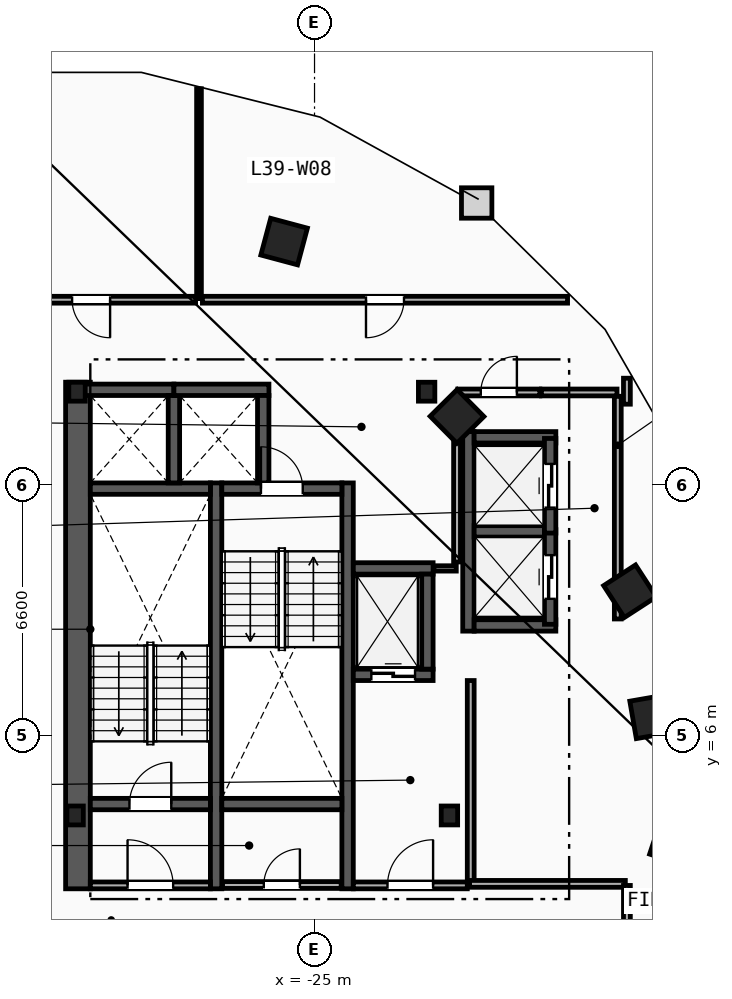
"""IFC4 building model, lengths in metres.
Left out: names, types, materials, properties, quantities, classifications, styles, units other than length and angle.
Written with IfcOpenShell. Run it as: python <this file> out.ifc"""

import sys

from ifc_helpers import new_model, si_unit, direction, frame, frame_2d, origin, origin_2d, place, context, subcontext, project, spatial, rectangle, i_section, extrude, element, fill, save


model = new_model("IFC4")
c1 = context("Model", 3, precision=1e-05, world=origin(), true_north=direction((0.0, 1.0)))
c2 = subcontext(c1, "Body", "Model", "MODEL_VIEW")
j1 = project(units=[si_unit("LENGTHUNIT", "METRE"), si_unit("PLANEANGLEUNIT", "RADIAN")], contexts=[c1])
p1 = place(None, origin())
s1 = spatial("IfcSite", under=j1, at=p1, CompositionType="ELEMENT")
p2 = place(p1, origin())
s2 = spatial("IfcBuilding", under=s1, at=p2, CompositionType="ELEMENT")
p3 = place(p2, frame((0.0, 0.0, 151.2)))
s3 = spatial("IfcBuildingStorey", under=s2, at=p3, CompositionType="ELEMENT", Elevation=151.2)
for number, where, z_axis, x_axis in (
    (1, (-31.3, 3.9, 0.0), (0.0, 0.0, 1.0), (1.0, 0.0, 0.0)),
    (2, (-21.45, 3.9, 0.0), (0.0, 0.0, 1.0), (1.0, 0.0, 0.0)),
    (3, (-22.05, 15.05, 0.0), (0.0, 0.0, 1.0), (1.0, 0.0, 0.0)),
    (4, (-31.25, 15.05, 0.0), (0.0, 0.0, 1.0), (1.0, 0.0, 0.0)),
):
    element("IfcColumn", number, at=place(p3, frame(where, z_axis=z_axis, x_axis=x_axis)), inside=s3, PredefinedType="COLUMN", context=c2, shape_type="SweptSolid", body=[
        extrude(i_section(OverallWidth=0.432, OverallDepth=0.498, WebThickness=0.056, FlangeThickness=0.089, FilletRadius=0.018, at=origin_2d()), origin(), (0.0, 0.0, 1.0), 3.6),
    ])
for number, where, z_axis, x_axis in (
    (5, (-15.55, 3.2, 0.0), (0.0, 0.0, 1.0), (0.315, 0.949, 0.0)),
    (6, (-16.125, 6.5, 0.0), (0.0, 0.0, 1.0), (-0.172, 0.985, 0.0)),
    (7, (-16.7, 9.8, 0.0), (0.0, 0.0, 1.0), (-0.544, 0.839, 0.0)),
    (8, (-21.25, 14.4, 0.0), (0.0, 0.0, 1.0), (-0.703, 0.711, 0.0)),
    (9, (-25.8, 19.0, 0.0), (0.0, 0.0, 1.0), (-0.966, 0.259, 0.0)),
):
    element("IfcColumn", number, at=place(p3, frame(where, z_axis=z_axis, x_axis=x_axis)), inside=s3, PredefinedType="COLUMN", context=c2, shape_type="SweptSolid", body=[
        extrude(rectangle(XDim=1.0, YDim=1.0, at=origin_2d()), origin(), (0.0, 0.0, 1.0), 3.6),
    ])
p4 = place(p3, frame((-31.225, 1.97, 0.0), z_axis=(0.0, 0.0, 1.0), x_axis=(0.0, 1.0, 0.0)))
e10 = element("IfcWall", 10, at=p4, inside=s3, PredefinedType="SHEAR", context=c2, shape_type="SweptSolid", body=[
    extrude(rectangle(XDim=13.33, YDim=0.65, at=frame_2d((6.665, 0.0))), origin(), (0.0, 0.0, 1.0), 3.36),
])
for number, where, z_axis, x_axis in (
    (11, (-27.59, 1.97, 0.0), (0.0, 0.0, 1.0), (0.0, 1.0, 0.0)),
    (12, (-24.13, 1.97, 0.0), (0.0, 0.0, 1.0), (0.0, 1.0, 0.0)),
):
    element("IfcWall", number, at=place(p3, frame(where, z_axis=z_axis, x_axis=x_axis)), inside=s3, PredefinedType="SHEAR", context=c2, shape_type="SweptSolid", body=[
        extrude(rectangle(XDim=10.68, YDim=0.3, at=frame_2d((5.34, 0.0))), origin(), (0.0, 0.0, 1.0), 3.36),
    ])
p5 = place(p3, frame((-30.9, 4.2, 0.0), z_axis=(0.0, 0.0, 1.0), x_axis=(1.0, 0.0, 0.0)))
e13 = element("IfcWall", 13, at=p5, inside=s3, PredefinedType="SHEAR", context=c2, shape_type="SweptSolid", body=[
    extrude(rectangle(XDim=3.16, YDim=0.3, at=frame_2d((1.58, 0.0))), origin(), (0.0, 0.0, 1.0), 3.36),
])
p6 = place(p5, frame((1.03, 0.0, 0.0)))
e14 = element("IfcOpeningElement", 14, at=p6, cuts=e13, PredefinedType="OPENING", context=c2, shape_type="SweptSolid", body=[
    extrude(rectangle(XDim=1.1, YDim=2.15, at=frame_2d((0.55, 1.075))), frame((0.0, 0.16, 0.0), z_axis=(0.0, -1.0, 0.0), x_axis=(1.0, 0.0, 0.0)), (0.0, 0.0, 1.0), 0.32),
])
p7 = place(p3, frame((-30.9, 12.5, 0.0), z_axis=(0.0, 0.0, 1.0), x_axis=(1.0, 0.0, 0.0)))
e15 = element("IfcWall", 15, at=p7, inside=s3, PredefinedType="SHEAR", context=c2, shape_type="SweptSolid", body=[
    extrude(rectangle(XDim=3.16, YDim=0.3, at=frame_2d((1.58, 0.0))), origin(), (0.0, 0.0, 1.0), 3.36),
])
p8 = place(p3, frame((-27.44, 12.5, 0.0), z_axis=(0.0, 0.0, 1.0), x_axis=(1.0, 0.0, 0.0)))
e16 = element("IfcWall", 16, at=p8, inside=s3, PredefinedType="SHEAR", context=c2, shape_type="SweptSolid", body=[
    extrude(rectangle(XDim=3.16, YDim=0.3, at=frame_2d((1.58, 0.0))), origin(), (0.0, 0.0, 1.0), 3.36),
])
p9 = place(p8, frame((1.03, 0.0, 0.0)))
e17 = element("IfcOpeningElement", 17, at=p9, cuts=e16, PredefinedType="OPENING", context=c2, shape_type="SweptSolid", body=[
    extrude(rectangle(XDim=1.1, YDim=2.15, at=frame_2d((0.55, 1.075))), frame((0.0, 0.16, 0.0), z_axis=(0.0, -1.0, 0.0), x_axis=(1.0, 0.0, 0.0)), (0.0, 0.0, 1.0), 0.32),
])
p10 = place(p3, frame((-27.44, 4.2, 0.0), z_axis=(0.0, 0.0, 1.0), x_axis=(1.0, 0.0, 0.0)))
e18 = element("IfcWall", 18, at=p10, inside=s3, PredefinedType="SHEAR", context=c2, shape_type="SweptSolid", body=[
    extrude(rectangle(XDim=3.16, YDim=0.3, at=frame_2d((1.58, 0.0))), origin(), (0.0, 0.0, 1.0), 3.36),
])
p11 = place(p3, frame((-20.89, 2.15, 0.0), z_axis=(0.0, 0.0, 1.0), x_axis=(0.0, 1.0, 0.0)))
e19 = element("IfcWall", 19, at=p11, inside=s3, PredefinedType="PARTITIONING", context=c2, shape_type="SweptSolid", body=[
    extrude(rectangle(XDim=5.3, YDim=0.18, at=frame_2d((2.65, 0.0))), origin(), (0.0, 0.0, 1.0), 3.36),
])
p12 = place(p3, frame((-23.98, 2.06, 0.0), z_axis=(0.0, 0.0, 1.0), x_axis=(1.0, 0.0, 0.0)))
e20 = element("IfcWall", 20, at=p12, inside=s3, PredefinedType="PARTITIONING", context=c2, shape_type="SweptSolid", body=[
    extrude(rectangle(XDim=3.0, YDim=0.18, at=frame_2d((1.5, 0.0))), origin(), (0.0, 0.0, 1.0), 3.36),
])
p13 = place(p12, frame((0.9, 0.0, 0.0)))
e21 = element("IfcOpeningElement", 21, at=p13, cuts=e20, PredefinedType="OPENING", context=c2, shape_type="SweptSolid", body=[
    extrude(rectangle(XDim=1.2, YDim=2.15, at=frame_2d((0.6, 1.075))), frame((0.0, 0.1, 0.0), z_axis=(0.0, -1.0, 0.0), x_axis=(1.0, 0.0, 0.0)), (0.0, 0.0, 1.0), 0.2),
])
p14 = place(p3, frame((-30.9, 2.06, 0.0), z_axis=(0.0, 0.0, 1.0), x_axis=(1.0, 0.0, 0.0)))
e22 = element("IfcWall", 22, at=p14, inside=s3, PredefinedType="PARTITIONING", context=c2, shape_type="SweptSolid", body=[
    extrude(rectangle(XDim=3.16, YDim=0.18, at=frame_2d((1.58, 0.0))), origin(), (0.0, 0.0, 1.0), 3.36),
])
p15 = place(p14, frame((0.98, 0.0, 0.0)))
e23 = element("IfcOpeningElement", 23, at=p15, cuts=e22, PredefinedType="OPENING", context=c2, shape_type="SweptSolid", body=[
    extrude(rectangle(XDim=1.2, YDim=2.15, at=frame_2d((0.6, 1.075))), frame((0.0, 0.1, 0.0), z_axis=(0.0, -1.0, 0.0), x_axis=(1.0, 0.0, 0.0)), (0.0, 0.0, 1.0), 0.2),
])
p16 = place(p3, frame((-23.98, 7.6, 0.0), z_axis=(0.0, 0.0, 1.0), x_axis=(1.0, 0.0, 0.0)))
e24 = element("IfcWall", 24, at=p16, inside=s3, PredefinedType="SHEAR", context=c2, shape_type="SweptSolid", body=[
    extrude(rectangle(XDim=2.1, YDim=0.3, at=frame_2d((1.05, 0.0))), origin(), (0.0, 0.0, 1.0), 3.36),
])
p17 = place(p16, frame((0.475, 0.0, 0.0)))
e25 = element("IfcOpeningElement", 25, at=p17, cuts=e24, PredefinedType="OPENING", context=c2, shape_type="SweptSolid", body=[
    extrude(rectangle(XDim=1.15, YDim=2.2, at=frame_2d((0.575, 1.1))), frame((0.0, 0.16, 0.0), z_axis=(0.0, -1.0, 0.0), x_axis=(1.0, 0.0, 0.0)), (0.0, 0.0, 1.0), 0.32),
])
p18 = place(p3, frame((-23.98, 10.4, 0.0), z_axis=(0.0, 0.0, 1.0), x_axis=(1.0, 0.0, 0.0)))
e26 = element("IfcWall", 26, at=p18, inside=s3, PredefinedType="SHEAR", context=c2, shape_type="SweptSolid", body=[
    extrude(rectangle(XDim=2.1, YDim=0.3, at=frame_2d((1.05, 0.0))), origin(), (0.0, 0.0, 1.0), 3.36),
])
for number, where, z_axis, x_axis in (
    (27, (-22.03, 7.75, 0.0), (0.0, 0.0, 1.0), (0.0, 1.0, 0.0)),
    (28, (-31.2, 15.1, 0.0), (0.0, 0.0, 1.0), (1.0, 0.0, 0.0)),
):
    element("IfcWall", number, at=place(p3, frame(where, z_axis=z_axis, x_axis=x_axis)), inside=s3, PredefinedType="SHEAR", context=c2, shape_type="SweptSolid", body=[
        extrude(rectangle(XDim=2.5, YDim=0.3, at=frame_2d((1.25, 0.0))), origin(), (0.0, 0.0, 1.0), 3.36),
    ])
p19 = place(p3, frame((-28.7, 12.65, 0.0), z_axis=(0.0, 0.0, 1.0), x_axis=(0.0, 1.0, 0.0)))
e29 = element("IfcWall", 29, at=p19, inside=s3, PredefinedType="SHEAR", context=c2, shape_type="SweptSolid", body=[
    extrude(rectangle(XDim=2.3, YDim=0.3, at=frame_2d((1.15, 0.0))), origin(), (0.0, 0.0, 1.0), 3.36),
])
p20 = place(p3, frame((-28.7, 15.1, 0.0), z_axis=(0.0, 0.0, 1.0), x_axis=(1.0, 0.0, 0.0)))
e30 = element("IfcWall", 30, at=p20, inside=s3, PredefinedType="SHEAR", context=c2, shape_type="SweptSolid", body=[
    extrude(rectangle(XDim=2.5, YDim=0.3, at=frame_2d((1.25, 0.0))), origin(), (0.0, 0.0, 1.0), 3.36),
])
p21 = place(p3, frame((-26.35, 12.65, 0.0), z_axis=(0.0, 0.0, 1.0), x_axis=(0.0, 1.0, 0.0)))
e31 = element("IfcWall", 31, at=p21, inside=s3, PredefinedType="SHEAR", context=c2, shape_type="SweptSolid", body=[
    extrude(rectangle(XDim=2.3, YDim=0.3, at=frame_2d((1.15, 0.0))), origin(), (0.0, 0.0, 1.0), 3.36),
])
p22 = place(p3, frame((-20.95, 8.75, 0.0), z_axis=(0.0, 0.0, 1.0), x_axis=(0.0, 1.0, 0.0)))
e32 = element("IfcWall", 32, at=p22, inside=s3, PredefinedType="SHEAR", context=c2, shape_type="SweptSolid", body=[
    extrude(rectangle(XDim=5.25, YDim=0.3, at=frame_2d((2.625, 0.0))), origin(), (0.0, 0.0, 1.0), 3.36),
])
for number, where, z_axis, x_axis in (
    (33, (-20.8, 8.9, 0.0), (0.0, 0.0, 1.0), (1.0, 0.0, 0.0)),
    (34, (-20.8, 13.85, 0.0), (0.0, 0.0, 1.0), (1.0, 0.0, 0.0)),
):
    element("IfcWall", number, at=place(p3, frame(where, z_axis=z_axis, x_axis=x_axis)), inside=s3, PredefinedType="SHEAR", context=c2, shape_type="SweptSolid", body=[
        extrude(rectangle(XDim=2.15, YDim=0.3, at=frame_2d((1.075, 0.0))), origin(), (0.0, 0.0, 1.0), 3.36),
    ])
p23 = place(p3, frame((-20.8, 11.375, 0.0), z_axis=(0.0, 0.0, 1.0), x_axis=(1.0, 0.0, 0.0)))
e35 = element("IfcWall", 35, at=p23, inside=s3, PredefinedType="SHEAR", context=c2, shape_type="SweptSolid", body=[
    extrude(rectangle(XDim=1.85, YDim=0.3, at=frame_2d((0.925, 0.0))), origin(), (0.0, 0.0, 1.0), 3.36),
])
p24 = place(p3, frame((-18.8, 8.93, 0.0), z_axis=(0.0, 0.0, 1.0), x_axis=(0.0, 1.0, 0.0)))
e36 = element("IfcWall", 36, at=p24, inside=s3, PredefinedType="SHEAR", context=c2, shape_type="SweptSolid", body=[
    extrude(rectangle(XDim=2.49, YDim=0.3, at=frame_2d((1.245, 0.0))), origin(), (0.0, 0.0, 1.0), 3.36),
])
p25 = place(p24, frame((0.67, 0.0, 0.0)))
e37 = element("IfcOpeningElement", 37, at=p25, cuts=e36, PredefinedType="OPENING", context=c2, shape_type="SweptSolid", body=[
    extrude(rectangle(XDim=1.15, YDim=2.2, at=frame_2d((0.575, 1.1))), frame((0.0, 0.16, 0.0), z_axis=(0.0, -1.0, 0.0), x_axis=(1.0, 0.0, 0.0)), (0.0, 0.0, 1.0), 0.32),
])
p26 = place(p3, frame((-18.8, 11.33, 0.0), z_axis=(0.0, 0.0, 1.0), x_axis=(0.0, 1.0, 0.0)))
e38 = element("IfcWall", 38, at=p26, inside=s3, PredefinedType="SHEAR", context=c2, shape_type="SweptSolid", body=[
    extrude(rectangle(XDim=2.49, YDim=0.3, at=frame_2d((1.245, 0.0))), origin(), (0.0, 0.0, 1.0), 3.36),
])
p27 = place(p26, frame((0.67, 0.0, 0.0)))
e39 = element("IfcOpeningElement", 39, at=p27, cuts=e38, PredefinedType="OPENING", context=c2, shape_type="SweptSolid", body=[
    extrude(rectangle(XDim=1.15, YDim=2.2, at=frame_2d((0.575, 1.1))), frame((0.0, 0.16, 0.0), z_axis=(0.0, -1.0, 0.0), x_axis=(1.0, 0.0, 0.0)), (0.0, 0.0, 1.0), 0.32),
])
p28 = place(p3, frame((-17.02, 9.07, 0.0), z_axis=(0.0, 0.0, 1.0), x_axis=(0.0, 1.0, 0.0)))
e40 = element("IfcWall", 40, at=p28, inside=s3, PredefinedType="PARTITIONING", context=c2, shape_type="SweptSolid", body=[
    extrude(rectangle(XDim=5.86, YDim=0.18, at=frame_2d((2.93, 0.0))), origin(), (0.0, 0.0, 1.0), 3.36),
])
p29 = place(p3, frame((-21.23, 15.03, 0.0), z_axis=(0.0, 0.0, 1.0), x_axis=(1.0, 0.0, 0.0)))
e41 = element("IfcWall", 41, at=p29, inside=s3, PredefinedType="PARTITIONING", context=c2, shape_type="SweptSolid", body=[
    extrude(rectangle(XDim=2.16, YDim=0.18, at=frame_2d((1.08, 0.0))), origin(), (0.0, 0.0, 1.0), 3.36),
])
p30 = place(p29, frame((0.605, 0.0, 0.0)))
e42 = element("IfcOpeningElement", 42, at=p30, cuts=e41, PredefinedType="OPENING", context=c2, shape_type="SweptSolid", body=[
    extrude(rectangle(XDim=0.95, YDim=2.1, at=frame_2d((0.475, 1.05))), frame((0.0, 0.1, 0.0), z_axis=(0.0, -1.0, 0.0), x_axis=(1.0, 0.0, 0.0)), (0.0, 0.0, 1.0), 0.2),
])
p31 = place(p3, frame((-19.03, 15.03, 0.0), z_axis=(0.0, 0.0, 1.0), x_axis=(1.0, 0.0, 0.0)))
e43 = element("IfcWall", 43, at=p31, inside=s3, PredefinedType="PARTITIONING", context=c2, shape_type="SweptSolid", body=[
    extrude(rectangle(XDim=1.99, YDim=0.18, at=frame_2d((0.995, 0.0))), origin(), (0.0, 0.0, 1.0), 3.36),
])
p32 = place(p3, frame((-21.86, 10.4, 0.0), z_axis=(0.0, 0.0, 1.0), x_axis=(1.0, 0.0, 0.0)))
e44 = element("IfcWall", 44, at=p32, inside=s3, PredefinedType="PARTITIONING", context=c2, shape_type="SweptSolid", body=[
    extrude(rectangle(XDim=0.59, YDim=0.14, at=frame_2d((0.295, 0.0))), origin(), (0.0, 0.0, 1.0), 3.36),
])
p33 = place(p3, frame((-21.25, 10.57, 0.0), z_axis=(0.0, 0.0, 1.0), x_axis=(0.0, 1.0, 0.0)))
e45 = element("IfcWall", 45, at=p33, inside=s3, PredefinedType="PARTITIONING", context=c2, shape_type="SweptSolid", body=[
    extrude(rectangle(XDim=4.36, YDim=0.18, at=frame_2d((2.18, 0.0))), origin(), (0.0, 0.0, 1.0), 3.36),
])
p34 = place(p3, frame((-27.42, 2.07, 0.0), z_axis=(0.0, 0.0, 1.0), x_axis=(1.0, 0.0, 0.0)))
e46 = element("IfcWall", 46, at=p34, inside=s3, PredefinedType="PARTITIONING", context=c2, shape_type="SweptSolid", body=[
    extrude(rectangle(XDim=3.12, YDim=0.18, at=frame_2d((1.56, 0.0))), origin(), (0.0, 0.0, 1.0), 3.36),
])
p35 = place(p34, frame((1.085, 0.0, 0.0)))
e47 = element("IfcOpeningElement", 47, at=p35, cuts=e46, PredefinedType="OPENING", context=c2, shape_type="SweptSolid", body=[
    extrude(rectangle(XDim=0.95, YDim=2.1, at=frame_2d((0.475, 1.05))), frame((0.0, 0.1, 0.0), z_axis=(0.0, -1.0, 0.0), x_axis=(1.0, 0.0, 0.0)), (0.0, 0.0, 1.0), 0.2),
])
p36 = place(p3, frame((-28.04, 17.5, 0.0), z_axis=(0.0, 0.0, 1.0), x_axis=(0.0, 1.0, 0.0)))
e48 = element("IfcWall", 48, at=p36, inside=s3, PredefinedType="PARTITIONING", context=c2, shape_type="SweptSolid", body=[
    extrude(rectangle(XDim=5.521, YDim=0.125, at=frame_2d((2.761, 0.0))), origin(), (0.0, 0.0, 1.0), 3.36),
])
p37 = place(p3, frame((-16.822, 2.1, 0.0), z_axis=(0.0, 0.0, 1.0), x_axis=(-1.0, 0.0, 0.0)))
e49 = element("IfcWall", 49, at=p37, inside=s3, PredefinedType="PARTITIONING", context=c2, shape_type="SweptSolid", body=[
    extrude(rectangle(XDim=4.098, YDim=0.18, at=frame_2d((2.049, 0.0))), origin(), (0.0, 0.0, 1.0), 3.36),
])
p38 = place(p3, frame((-16.78, -0.329, 0.0), z_axis=(0.0, 0.0, 1.0), x_axis=(0.0, 1.0, 0.0)))
e50 = element("IfcWall", 50, at=p38, inside=s3, PredefinedType="PARTITIONING", context=c2, shape_type="SweptSolid", body=[
    extrude(rectangle(XDim=2.387, YDim=0.18, at=frame_2d((1.194, 0.0))), origin(), (0.0, 0.0, 1.0), 3.36),
])
p39 = place(p3, frame((-16.78, 14.721, 0.0), z_axis=(0.0, 0.0, 1.0), x_axis=(0.0, 1.0, 0.0)))
e51 = element("IfcWall", 51, at=p39, inside=s3, PredefinedType="PARTITIONING", context=c2, shape_type="SweptSolid", body=[
    extrude(rectangle(XDim=0.684, YDim=0.18, at=frame_2d((0.342, 0.0))), origin(), (0.0, 0.0, 1.0), 3.36),
])
p40 = place(p3, frame((-28.13, 17.47, 0.0), z_axis=(0.0, 0.0, 1.0), x_axis=(-1.0, 0.0, 0.0)))
e52 = element("IfcWall", 52, at=p40, inside=s3, PredefinedType="PARTITIONING", context=c2, shape_type="SweptSolid", body=[
    extrude(rectangle(XDim=5.499, YDim=0.18, at=frame_2d((2.749, 0.0))), origin(), (0.0, 0.0, 1.0), 3.36),
])
p41 = place(p40, frame((2.249, 0.0, 0.0)))
e53 = element("IfcOpeningElement", 53, at=p41, cuts=e52, PredefinedType="OPENING", context=c2, shape_type="SweptSolid", body=[
    extrude(rectangle(XDim=1.0, YDim=2.15, at=frame_2d((0.5, 1.075))), frame((0.0, 0.1, 0.0), z_axis=(0.0, -1.0, 0.0), x_axis=(1.0, 0.0, 0.0)), (0.0, 0.0, 1.0), 0.2),
])
p42 = place(p3, frame((-18.342, 17.47, 0.0), z_axis=(0.0, 0.0, 1.0), x_axis=(-1.0, 0.0, 0.0)))
e54 = element("IfcWall", 54, at=p42, inside=s3, PredefinedType="PARTITIONING", context=c2, shape_type="SweptSolid", body=[
    extrude(rectangle(XDim=9.608, YDim=0.18, at=frame_2d((4.804, 0.0))), origin(), (0.0, 0.0, 1.0), 3.36),
])
p43 = place(p42, frame((4.304, 0.0, 0.0)))
e55 = element("IfcOpeningElement", 55, at=p43, cuts=e54, PredefinedType="OPENING", context=c2, shape_type="SweptSolid", body=[
    extrude(rectangle(XDim=1.0, YDim=2.15, at=frame_2d((0.5, 1.075))), frame((0.0, 0.1, 0.0), z_axis=(0.0, -1.0, 0.0), x_axis=(1.0, 0.0, 0.0)), (0.0, 0.0, 1.0), 0.2),
])
p44 = place(p6, origin())
e56 = element("IfcDoor", 56, at=p44, inside=s3, OperationType="SINGLE_SWING_RIGHT", PredefinedType="DOOR", context=c2, shape_type="SweptSolid", body=[
    extrude(rectangle(XDim=1.1, YDim=2.15, at=frame_2d((0.55, 1.075))), frame((0.0, 0.025, 0.0), z_axis=(0.0, -1.0, 0.0), x_axis=(1.0, 0.0, 0.0)), (0.0, 0.0, 1.0), 0.05),
])
fill(e14, e56)
p45 = place(p9, origin())
e57 = element("IfcDoor", 57, at=p45, inside=s3, OperationType="SINGLE_SWING_LEFT", PredefinedType="DOOR", context=c2, shape_type="SweptSolid", body=[
    extrude(rectangle(XDim=1.1, YDim=2.15, at=frame_2d((0.55, 1.075))), frame((0.0, 0.025, 0.0), z_axis=(0.0, -1.0, 0.0), x_axis=(1.0, 0.0, 0.0)), (0.0, 0.0, 1.0), 0.05),
])
fill(e17, e57)
p46 = place(p13, origin())
e58 = element("IfcDoor", 58, at=p46, inside=s3, OperationType="SINGLE_SWING_RIGHT", PredefinedType="DOOR", context=c2, shape_type="SweptSolid", body=[
    extrude(rectangle(XDim=1.2, YDim=2.15, at=frame_2d((0.6, 1.075))), frame((0.0, 0.025, 0.0), z_axis=(0.0, -1.0, 0.0), x_axis=(1.0, 0.0, 0.0)), (0.0, 0.0, 1.0), 0.05),
])
fill(e21, e58)
p47 = place(p15, origin())
e59 = element("IfcDoor", 59, at=p47, inside=s3, OperationType="SINGLE_SWING_LEFT", PredefinedType="DOOR", context=c2, shape_type="SweptSolid", body=[
    extrude(rectangle(XDim=1.2, YDim=2.15, at=frame_2d((0.6, 1.075))), frame((0.0, 0.025, 0.0), z_axis=(0.0, -1.0, 0.0), x_axis=(1.0, 0.0, 0.0)), (0.0, 0.0, 1.0), 0.05),
])
fill(e23, e59)
p48 = place(p17, origin())
e60 = element("IfcDoor", 60, at=p48, inside=s3, OperationType="SLIDING_TO_LEFT", PredefinedType="TRAPDOOR", context=c2, shape_type="SweptSolid", body=[
    extrude(rectangle(XDim=1.15, YDim=2.2, at=frame_2d((0.575, 1.1))), frame((0.0, 0.025, 0.0), z_axis=(0.0, -1.0, 0.0), x_axis=(1.0, 0.0, 0.0)), (0.0, 0.0, 1.0), 0.05),
])
fill(e25, e60)
p49 = place(p25, origin())
e61 = element("IfcDoor", 61, at=p49, inside=s3, OperationType="SLIDING_TO_LEFT", PredefinedType="TRAPDOOR", context=c2, shape_type="SweptSolid", body=[
    extrude(rectangle(XDim=1.15, YDim=2.2, at=frame_2d((0.575, 1.1))), frame((0.0, 0.025, 0.0), z_axis=(0.0, -1.0, 0.0), x_axis=(1.0, 0.0, 0.0)), (0.0, 0.0, 1.0), 0.05),
])
fill(e37, e61)
p50 = place(p27, origin())
e62 = element("IfcDoor", 62, at=p50, inside=s3, OperationType="SLIDING_TO_LEFT", PredefinedType="TRAPDOOR", context=c2, shape_type="SweptSolid", body=[
    extrude(rectangle(XDim=1.15, YDim=2.2, at=frame_2d((0.575, 1.1))), frame((0.0, 0.025, 0.0), z_axis=(0.0, -1.0, 0.0), x_axis=(1.0, 0.0, 0.0)), (0.0, 0.0, 1.0), 0.05),
])
fill(e39, e62)
p51 = place(p43, origin())
e63 = element("IfcDoor", 63, at=p51, inside=s3, OperationType="SINGLE_SWING_RIGHT", PredefinedType="DOOR", context=c2, shape_type="SweptSolid", body=[
    extrude(rectangle(XDim=1.0, YDim=2.15, at=frame_2d((0.5, 1.075))), frame((0.0, 0.025, 0.0), z_axis=(0.0, -1.0, 0.0), x_axis=(1.0, 0.0, 0.0)), (0.0, 0.0, 1.0), 0.05),
])
fill(e55, e63)
p52 = place(p41, origin())
e64 = element("IfcDoor", 64, at=p52, inside=s3, OperationType="SINGLE_SWING_LEFT", PredefinedType="DOOR", context=c2, shape_type="SweptSolid", body=[
    extrude(rectangle(XDim=1.0, YDim=2.15, at=frame_2d((0.5, 1.075))), frame((0.0, 0.025, 0.0), z_axis=(0.0, -1.0, 0.0), x_axis=(1.0, 0.0, 0.0)), (0.0, 0.0, 1.0), 0.05),
])
fill(e53, e64)
p53 = place(p35, origin())
e65 = element("IfcDoor", 65, at=p53, inside=s3, OperationType="SINGLE_SWING_RIGHT", PredefinedType="DOOR", context=c2, shape_type="SweptSolid", body=[
    extrude(rectangle(XDim=0.95, YDim=2.1, at=frame_2d((0.475, 1.05))), frame((0.0, 0.025, 0.0), z_axis=(0.0, -1.0, 0.0), x_axis=(1.0, 0.0, 0.0)), (0.0, 0.0, 1.0), 0.05),
])
fill(e47, e65)
p54 = place(p30, origin())
e66 = element("IfcDoor", 66, at=p54, inside=s3, OperationType="SINGLE_SWING_RIGHT", PredefinedType="DOOR", context=c2, shape_type="SweptSolid", body=[
    extrude(rectangle(XDim=0.95, YDim=2.1, at=frame_2d((0.475, 1.05))), frame((0.0, 0.025, 0.0), z_axis=(0.0, -1.0, 0.0), x_axis=(1.0, 0.0, 0.0)), (0.0, 0.0, 1.0), 0.05),
])
fill(e42, e66)
save(model, sys.argv[1])
